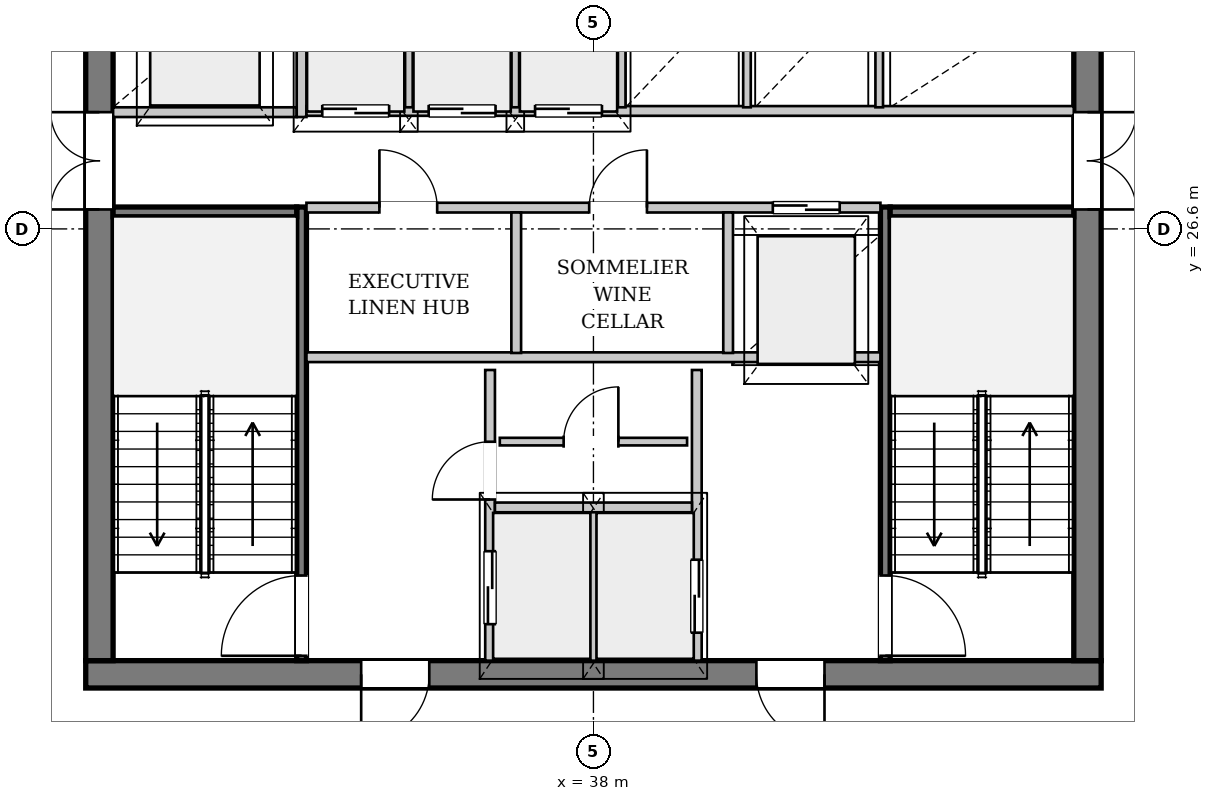
"""IFC4 building model, lengths in metres.
Left out: names, types, materials, properties, quantities, classifications, styles, units other than length and angle.
Written with IfcOpenShell. Run it as: python <this file> out.ifc"""

import sys

from ifc_helpers import new_model, si_unit, direction, frame, frame_2d, origin, place, context, subcontext, project, spatial, rectangle, extrude, source, transform, mapped, element, fill, save


model = new_model("IFC4")
c1 = context("Model", 3, precision=1e-05, world=origin(), true_north=direction((0.0, 1.0)))
c2 = subcontext(c1, "Body", "Model", "MODEL_VIEW")
j1 = project(units=[si_unit("LENGTHUNIT", "METRE"), si_unit("PLANEANGLEUNIT", "RADIAN")], contexts=[c1])
p1 = place(None, origin())
s1 = spatial("IfcSite", under=j1, at=p1, CompositionType="ELEMENT")
p2 = place(p1, origin())
s2 = spatial("IfcBuilding", under=s1, at=p2, CompositionType="ELEMENT")
p3 = place(p2, frame((0.0, 0.0, 234.5)))
s3 = spatial("IfcBuildingStorey", under=s2, at=p3, CompositionType="ELEMENT", Elevation=234.5)
p4 = place(p3, frame((52.618, 24.954, 0.0), z_axis=(0.0, 0.0, 1.0), x_axis=(-0.386897414412, -0.922122763368, 0.0)))
e1 = element("IfcWall", 1, at=p4, inside=s3, PredefinedType="SOLIDWALL", context=c2, shape_type="SweptSolid", body=[
    extrude(rectangle(XDim=22.869, YDim=0.32, at=frame_2d((11.435, 0.0))), origin(), (0.0, 0.0, 1.0), 2.872),
])
p5 = place(p4, frame((7.668, 0.0, 0.0)))
e2 = element("IfcOpeningElement", 2, at=p5, cuts=e1, PredefinedType="OPENING", context=c2, shape_type="SweptSolid", body=[
    extrude(rectangle(XDim=1.5, YDim=2.3, at=frame_2d((0.75, 1.15))), frame((0.0, 0.17, 0.0), z_axis=(0.0, -1.0, 0.0), x_axis=(1.0, 0.0, 0.0)), (0.0, 0.0, 1.0), 0.34),
])
p6 = place(p4, frame((15.623, 0.0, 0.402)))
e3 = element("IfcOpeningElement", 3, at=p6, cuts=e1, PredefinedType="OPENING", context=c2, shape_type="SweptSolid", body=[
    extrude(rectangle(XDim=2.6, YDim=2.35, at=frame_2d((1.3, 1.175))), frame((0.0, 0.17, 0.0), z_axis=(0.0, -1.0, 0.0), x_axis=(1.0, 0.0, 0.0)), (0.0, 0.0, 1.0), 0.34),
])
p7 = place(p3, frame((46.35, 19.275, 0.0), z_axis=(0.0, 0.0, 1.0), x_axis=(-1.0, 0.0, 0.0)))
e4 = element("IfcWall", 4, at=p7, inside=s3, PredefinedType="SHEAR", context=c2, shape_type="SweptSolid", body=[
    extrude(rectangle(XDim=16.7, YDim=0.45, at=frame_2d((8.35, 0.0))), origin(), (0.0, 0.0, 1.0), 3.38),
])
p8 = place(p7, frame((4.55, 0.0, 0.0)))
e5 = element("IfcOpeningElement", 5, at=p8, cuts=e4, PredefinedType="OPENING", context=c2, shape_type="SweptSolid", body=[
    extrude(rectangle(XDim=1.12, YDim=2.25, at=frame_2d((0.56, 1.125))), frame((0.0, 0.235, 0.0), z_axis=(0.0, -1.0, 0.0), x_axis=(1.0, 0.0, 0.0)), (0.0, 0.0, 1.0), 0.47),
])
p9 = place(p7, frame((11.05, 0.0, 0.0)))
e6 = element("IfcOpeningElement", 6, at=p9, cuts=e4, PredefinedType="OPENING", context=c2, shape_type="SweptSolid", body=[
    extrude(rectangle(XDim=1.12, YDim=2.25, at=frame_2d((0.56, 1.125))), frame((0.0, 0.235, 0.0), z_axis=(0.0, -1.0, 0.0), x_axis=(1.0, 0.0, 0.0)), (0.0, 0.0, 1.0), 0.47),
])
p10 = place(p3, frame((29.875, 19.5, 0.0), z_axis=(0.0, 0.0, 1.0), x_axis=(0.0, 1.0, 0.0)))
e7 = element("IfcWall", 7, at=p10, inside=s3, PredefinedType="SHEAR", context=c2, shape_type="SweptSolid", body=[
    extrude(rectangle(XDim=14.2, YDim=0.45, at=frame_2d((7.1, 0.0))), origin(), (0.0, 0.0, 1.0), 3.38),
])
p11 = place(p10, frame((7.42, 0.0, 0.0)))
e8 = element("IfcOpeningElement", 8, at=p11, cuts=e7, PredefinedType="OPENING", context=c2, shape_type="SweptSolid", body=[
    extrude(rectangle(XDim=1.6, YDim=2.2, at=frame_2d((0.8, 1.1))), frame((0.0, 0.235, 0.0), z_axis=(0.0, -1.0, 0.0), x_axis=(1.0, 0.0, 0.0)), (0.0, 0.0, 1.0), 0.47),
])
p12 = place(p3, frame((46.125, 33.7, 0.0), z_axis=(0.0, 0.0, 1.0), x_axis=(0.0, -1.0, 0.0)))
e9 = element("IfcWall", 9, at=p12, inside=s3, PredefinedType="SHEAR", context=c2, shape_type="SweptSolid", body=[
    extrude(rectangle(XDim=14.2, YDim=0.45, at=frame_2d((7.1, 0.0))), origin(), (0.0, 0.0, 1.0), 3.38),
])
p13 = place(p12, frame((5.18, 0.0, 0.0)))
e10 = element("IfcOpeningElement", 10, at=p13, cuts=e9, PredefinedType="OPENING", context=c2, shape_type="SweptSolid", body=[
    extrude(rectangle(XDim=1.6, YDim=2.2, at=frame_2d((0.8, 1.1))), frame((0.0, 0.235, 0.0), z_axis=(0.0, -1.0, 0.0), x_axis=(1.0, 0.0, 0.0)), (0.0, 0.0, 1.0), 0.47),
])
p14 = place(p12, frame((2.05, 0.0, 0.0)))
e11 = element("IfcOpeningElement", 11, at=p14, cuts=e9, PredefinedType="OPENING", context=c2, shape_type="SweptSolid", body=[
    extrude(rectangle(XDim=0.95, YDim=2.1, at=frame_2d((0.475, 1.05))), frame((0.0, 0.235, 0.0), z_axis=(0.0, -1.0, 0.0), x_axis=(1.0, 0.0, 0.0)), (0.0, 0.0, 1.0), 0.47),
])
p15 = place(p3, frame((33.2, 19.5, 0.0), z_axis=(0.0, 0.0, 1.0), x_axis=(0.0, 1.0, 0.0)))
e12 = element("IfcWall", 12, at=p15, inside=s3, PredefinedType="PARTITIONING", context=c2, shape_type="SweptSolid", body=[
    extrude(rectangle(XDim=7.46, YDim=0.16, at=frame_2d((3.73, 0.0))), origin(), (0.0, 0.0, 1.0), 3.38),
])
p16 = place(p15, frame((0.08, 0.0, 0.0)))
e13 = element("IfcOpeningElement", 13, at=p16, cuts=e12, PredefinedType="OPENING", context=c2, shape_type="SweptSolid", body=[
    extrude(rectangle(XDim=1.32, YDim=2.2, at=frame_2d((0.66, 1.1))), frame((0.0, 0.09, 0.0), z_axis=(0.0, -1.0, 0.0), x_axis=(1.0, 0.0, 0.0)), (0.0, 0.0, 1.0), 0.18),
])
p17 = place(p3, frame((30.1, 26.88, 0.0), z_axis=(0.0, 0.0, 1.0), x_axis=(1.0, 0.0, 0.0)))
e14 = element("IfcWall", 14, at=p17, inside=s3, PredefinedType="PARTITIONING", context=c2, shape_type="SweptSolid", body=[
    extrude(rectangle(XDim=3.02, YDim=0.16, at=frame_2d((1.51, 0.0))), origin(), (0.0, 0.0, 1.0), 3.38),
])
p18 = place(p3, frame((42.8, 26.96, 0.0), z_axis=(0.0, 0.0, 1.0), x_axis=(0.0, -1.0, 0.0)))
e15 = element("IfcWall", 15, at=p18, inside=s3, PredefinedType="PARTITIONING", context=c2, shape_type="SweptSolid", body=[
    extrude(rectangle(XDim=7.46, YDim=0.16, at=frame_2d((3.73, 0.0))), origin(), (0.0, 0.0, 1.0), 3.38),
])
p19 = place(p18, frame((6.06, 0.0, 0.0)))
e16 = element("IfcOpeningElement", 16, at=p19, cuts=e15, PredefinedType="OPENING", context=c2, shape_type="SweptSolid", body=[
    extrude(rectangle(XDim=1.32, YDim=2.2, at=frame_2d((0.66, 1.1))), frame((0.0, 0.09, 0.0), z_axis=(0.0, -1.0, 0.0), x_axis=(1.0, 0.0, 0.0)), (0.0, 0.0, 1.0), 0.18),
])
p20 = place(p3, frame((42.88, 26.88, 0.0), z_axis=(0.0, 0.0, 1.0), x_axis=(1.0, 0.0, 0.0)))
e17 = element("IfcWall", 17, at=p20, inside=s3, PredefinedType="PARTITIONING", context=c2, shape_type="SweptSolid", body=[
    extrude(rectangle(XDim=3.02, YDim=0.16, at=frame_2d((1.51, 0.0))), origin(), (0.0, 0.0, 1.0), 3.38),
])
p21 = place(p3, frame((36.3, 19.5, 0.0), z_axis=(0.0, 0.0, 1.0), x_axis=(0.0, 1.0, 0.0)))
e18 = element("IfcWall", 18, at=p21, inside=s3, PredefinedType="PARTITIONING", context=c2, shape_type="SweptSolid", body=[
    extrude(rectangle(XDim=4.78, YDim=0.16, at=frame_2d((2.39, 0.0))), origin(), (0.0, 0.0, 1.0), 3.38),
])
p22 = place(p21, frame((0.6, 0.0, 0.0)))
e19 = element("IfcOpeningElement", 19, at=p22, cuts=e18, PredefinedType="OPENING", context=c2, shape_type="SweptSolid", body=[
    extrude(rectangle(XDim=1.2, YDim=2.2, at=frame_2d((0.6, 1.1))), frame((0.0, 0.09, 0.0), z_axis=(0.0, -1.0, 0.0), x_axis=(1.0, 0.0, 0.0)), (0.0, 0.0, 1.0), 0.18),
])
p23 = place(p21, frame((2.65, 0.0, 0.0)))
e20 = element("IfcOpeningElement", 20, at=p23, cuts=e18, PredefinedType="OPENING", context=c2, shape_type="SweptSolid", body=[
    extrude(rectangle(XDim=0.95, YDim=2.1, at=frame_2d((0.475, 1.05))), frame((0.0, 0.09, 0.0), z_axis=(0.0, -1.0, 0.0), x_axis=(1.0, 0.0, 0.0)), (0.0, 0.0, 1.0), 0.18),
])
p24 = place(p3, frame((39.7, 24.28, 0.0), z_axis=(0.0, 0.0, 1.0), x_axis=(0.0, -1.0, 0.0)))
e21 = element("IfcWall", 21, at=p24, inside=s3, PredefinedType="PARTITIONING", context=c2, shape_type="SweptSolid", body=[
    extrude(rectangle(XDim=4.78, YDim=0.16, at=frame_2d((2.39, 0.0))), origin(), (0.0, 0.0, 1.0), 3.38),
])
p25 = place(p24, frame((3.12, 0.0, 0.0)))
e22 = element("IfcOpeningElement", 22, at=p25, cuts=e21, PredefinedType="OPENING", context=c2, shape_type="SweptSolid", body=[
    extrude(rectangle(XDim=1.2, YDim=2.2, at=frame_2d((0.6, 1.1))), frame((0.0, 0.09, 0.0), z_axis=(0.0, -1.0, 0.0), x_axis=(1.0, 0.0, 0.0)), (0.0, 0.0, 1.0), 0.18),
])
p26 = place(p3, frame((38.0, 19.5, 0.0), z_axis=(0.0, 0.0, 1.0), x_axis=(0.0, 1.0, 0.0)))
e23 = element("IfcWall", 23, at=p26, inside=s3, PredefinedType="PARTITIONING", context=c2, shape_type="SweptSolid", body=[
    extrude(rectangle(XDim=2.46, YDim=0.125, at=frame_2d((1.23, 0.0))), origin(), (0.0, 0.0, 1.0), 3.38),
])
p27 = place(p3, frame((36.38, 22.02, 0.0), z_axis=(0.0, 0.0, 1.0), x_axis=(1.0, 0.0, 0.0)))
e24 = element("IfcWall", 24, at=p27, inside=s3, PredefinedType="PARTITIONING", context=c2, shape_type="SweptSolid", body=[
    extrude(rectangle(XDim=3.24, YDim=0.16, at=frame_2d((1.62, 0.0))), origin(), (0.0, 0.0, 1.0), 3.38),
])
p28 = place(p3, frame((33.28, 24.49, 0.0), z_axis=(0.0, 0.0, 1.0), x_axis=(1.0, 0.0, 0.0)))
e25 = element("IfcWall", 25, at=p28, inside=s3, PredefinedType="PARTITIONING", context=c2, shape_type="SweptSolid", body=[
    extrude(rectangle(XDim=9.44, YDim=0.16, at=frame_2d((4.72, 0.0))), origin(), (0.0, 0.0, 1.0), 3.38),
])
p29 = place(p3, frame((36.46, 23.102, 0.0), z_axis=(0.0, 0.0, 1.0), x_axis=(1.0, 0.0, 0.0)))
e26 = element("IfcWall", 26, at=p29, inside=s3, PredefinedType="PARTITIONING", context=c2, shape_type="SweptSolid", body=[
    extrude(rectangle(XDim=3.08, YDim=0.125, at=frame_2d((1.54, 0.0))), origin(), (0.0, 0.0, 1.0), 3.38),
])
p30 = place(p29, frame((1.05, 0.0, 0.0)))
e27 = element("IfcOpeningElement", 27, at=p30, cuts=e26, PredefinedType="OPENING", context=c2, shape_type="SweptSolid", body=[
    extrude(rectangle(XDim=0.9, YDim=2.1, at=frame_2d((0.45, 1.05))), frame((0.0, 0.073, 0.0), z_axis=(0.0, -1.0, 0.0), x_axis=(1.0, 0.0, 0.0)), (0.0, 0.0, 1.0), 0.145),
])
p31 = place(p3, frame((30.1, 28.52, 0.0), z_axis=(0.0, 0.0, 1.0), x_axis=(1.0, 0.0, 0.0)))
e28 = element("IfcWall", 28, at=p31, inside=s3, PredefinedType="PARTITIONING", context=c2, shape_type="SweptSolid", body=[
    extrude(rectangle(XDim=3.02, YDim=0.16, at=frame_2d((1.51, 0.0))), origin(), (0.0, 0.0, 1.0), 3.38),
])
p32 = place(p3, frame((33.2, 28.44, 0.0), z_axis=(0.0, 0.0, 1.0), x_axis=(0.0, 1.0, 0.0)))
e29 = element("IfcWall", 29, at=p32, inside=s3, PredefinedType="PARTITIONING", context=c2, shape_type="SweptSolid", body=[
    extrude(rectangle(XDim=5.26, YDim=0.16, at=frame_2d((2.63, 0.0))), origin(), (0.0, 0.0, 1.0), 3.38),
])
p33 = place(p3, frame((33.28, 26.95, 0.0), z_axis=(0.0, 0.0, 1.0), x_axis=(1.0, 0.0, 0.0)))
e30 = element("IfcWall", 30, at=p33, inside=s3, PredefinedType="PARTITIONING", context=c2, shape_type="SweptSolid", body=[
    extrude(rectangle(XDim=9.44, YDim=0.16, at=frame_2d((4.72, 0.0))), origin(), (0.0, 0.0, 1.0), 3.38),
])
p34 = place(p33, frame((1.2, 0.0, 0.0)))
e31 = element("IfcOpeningElement", 31, at=p34, cuts=e30, PredefinedType="OPENING", context=c2, shape_type="SweptSolid", body=[
    extrude(rectangle(XDim=0.95, YDim=2.1, at=frame_2d((0.475, 1.05))), frame((0.0, 0.09, 0.0), z_axis=(0.0, -1.0, 0.0), x_axis=(1.0, 0.0, 0.0)), (0.0, 0.0, 1.0), 0.18),
])
p35 = place(p33, frame((4.65, 0.0, 0.0)))
e32 = element("IfcOpeningElement", 32, at=p35, cuts=e30, PredefinedType="OPENING", context=c2, shape_type="SweptSolid", body=[
    extrude(rectangle(XDim=0.95, YDim=2.1, at=frame_2d((0.475, 1.05))), frame((0.0, 0.09, 0.0), z_axis=(0.0, -1.0, 0.0), x_axis=(1.0, 0.0, 0.0)), (0.0, 0.0, 1.0), 0.18),
])
p36 = place(p33, frame((7.67, 0.0, 0.0)))
e33 = element("IfcOpeningElement", 33, at=p36, cuts=e30, PredefinedType="OPENING", context=c2, shape_type="SweptSolid", body=[
    extrude(rectangle(XDim=1.1, YDim=2.2, at=frame_2d((0.55, 1.1))), frame((0.0, 0.09, 0.0), z_axis=(0.0, -1.0, 0.0), x_axis=(1.0, 0.0, 0.0)), (0.0, 0.0, 1.0), 0.18),
])
for number, where, z_axis, x_axis in (
    (34, (36.73, 24.56, 0.0), (0.0, 0.0, 1.0), (0.0, 1.0, 0.0)),
    (35, (40.215, 24.56, 0.0), (0.0, 0.0, 1.0), (0.0, 1.0, 0.0)),
):
    element("IfcWall", number, at=place(p3, frame(where, z_axis=z_axis, x_axis=x_axis)), inside=s3, PredefinedType="PARTITIONING", context=c2, shape_type="SweptSolid", body=[
        extrude(rectangle(XDim=2.31, YDim=0.16, at=frame_2d((1.155, 0.0))), origin(), (0.0, 0.0, 1.0), 3.38),
    ])
p37 = place(p3, frame((33.28, 28.54, 0.0), z_axis=(0.0, 0.0, 1.0), x_axis=(1.0, 0.0, 0.0)))
e36 = element("IfcWall", 36, at=p37, inside=s3, PredefinedType="PARTITIONING", context=c2, shape_type="SweptSolid", body=[
    extrude(rectangle(XDim=12.62, YDim=0.16, at=frame_2d((6.31, 0.0))), origin(), (0.0, 0.0, 1.0), 3.38),
])
p38 = place(p37, frame((0.26, 0.0, 0.0)))
e37 = element("IfcOpeningElement", 37, at=p38, cuts=e36, PredefinedType="OPENING", context=c2, shape_type="SweptSolid", body=[
    extrude(rectangle(XDim=1.1, YDim=2.2, at=frame_2d((0.55, 1.1))), frame((0.0, 0.09, 0.0), z_axis=(0.0, -1.0, 0.0), x_axis=(1.0, 0.0, 0.0)), (0.0, 0.0, 1.0), 0.18),
])
p39 = place(p37, frame((2.01, 0.0, 0.0)))
e38 = element("IfcOpeningElement", 38, at=p39, cuts=e36, PredefinedType="OPENING", context=c2, shape_type="SweptSolid", body=[
    extrude(rectangle(XDim=1.1, YDim=2.2, at=frame_2d((0.55, 1.1))), frame((0.0, 0.09, 0.0), z_axis=(0.0, -1.0, 0.0), x_axis=(1.0, 0.0, 0.0)), (0.0, 0.0, 1.0), 0.18),
])
p40 = place(p37, frame((3.76, 0.0, 0.0)))
e39 = element("IfcOpeningElement", 39, at=p40, cuts=e36, PredefinedType="OPENING", context=c2, shape_type="SweptSolid", body=[
    extrude(rectangle(XDim=1.1, YDim=2.2, at=frame_2d((0.55, 1.1))), frame((0.0, 0.09, 0.0), z_axis=(0.0, -1.0, 0.0), x_axis=(1.0, 0.0, 0.0)), (0.0, 0.0, 1.0), 0.18),
])
for number, where, z_axis, x_axis in (
    (40, (34.965, 28.6, 0.0), (0.0, 0.0, 1.0), (0.0, 1.0, 0.0)),
    (41, (36.715, 28.6, 0.0), (0.0, 0.0, 1.0), (0.0, 1.0, 0.0)),
    (42, (38.465, 28.6, 0.0), (0.0, 0.0, 1.0), (0.0, 1.0, 0.0)),
    (43, (40.525, 28.6, 0.0), (0.0, 0.0, 1.0), (0.0, 1.0, 0.0)),
    (44, (42.7, 28.6, 0.0), (0.0, 0.0, 1.0), (0.0, 1.0, 0.0)),
):
    element("IfcWall", number, at=place(p3, frame(where, z_axis=z_axis, x_axis=x_axis)), inside=s3, PredefinedType="PARTITIONING", context=c2, shape_type="SweptSolid", body=[
        extrude(rectangle(XDim=1.92, YDim=0.125, at=frame_2d((0.96, 0.0))), origin(), (0.0, 0.0, 1.0), 3.38),
    ])
m1 = source(origin(), c2, "Body", "SweptSolid", [
    extrude(rectangle(XDim=1.12, YDim=2.25, at=frame_2d((0.56, 1.125))), frame((0.0, 0.025, 0.0), z_axis=(0.0, -1.0, 0.0), x_axis=(1.0, 0.0, 0.0)), (0.0, 0.0, 1.0), 0.05),
])
p41 = place(p8, origin())
e45 = element("IfcDoor", 45, at=p41, inside=s3, OperationType="SINGLE_SWING_LEFT", PredefinedType="DOOR", context=c2, shape_type="MappedRepresentation", body=[
    mapped(m1, transform((0.0, 0.0, 0.0), x_axis=(1.0, 0.0, 0.0), y_axis=(0.0, 1.0, 0.0), z_axis=(0.0, 0.0, 1.0), scale=1.0)),
])
fill(e5, e45)
p42 = place(p9, origin())
e46 = element("IfcDoor", 46, at=p42, inside=s3, OperationType="SINGLE_SWING_RIGHT", PredefinedType="DOOR", context=c2, shape_type="MappedRepresentation", body=[
    mapped(m1, transform((0.0, 0.0, 0.0), x_axis=(1.0, 0.0, 0.0), y_axis=(0.0, 1.0, 0.0), z_axis=(0.0, 0.0, 1.0), scale=1.0)),
])
fill(e6, e46)
m2 = source(origin(), c2, "Body", "SweptSolid", [
    extrude(rectangle(XDim=1.6, YDim=2.2, at=frame_2d((0.8, 1.1))), frame((0.0, 0.025, 0.0), z_axis=(0.0, -1.0, 0.0), x_axis=(1.0, 0.0, 0.0)), (0.0, 0.0, 1.0), 0.05),
])
p43 = place(p11, origin())
e47 = element("IfcDoor", 47, at=p43, inside=s3, OperationType="DOUBLE_DOOR_SINGLE_SWING", PredefinedType="DOOR", context=c2, shape_type="MappedRepresentation", body=[
    mapped(m2, transform((0.0, 0.0, 0.0), x_axis=(1.0, 0.0, 0.0), y_axis=(0.0, 1.0, 0.0), z_axis=(0.0, 0.0, 1.0), scale=1.0)),
])
fill(e8, e47)
p44 = place(p13, origin())
e48 = element("IfcDoor", 48, at=p44, inside=s3, OperationType="DOUBLE_DOOR_SINGLE_SWING", PredefinedType="DOOR", context=c2, shape_type="MappedRepresentation", body=[
    mapped(m2, transform((0.0, 0.0, 0.0), x_axis=(1.0, 0.0, 0.0), y_axis=(0.0, 1.0, 0.0), z_axis=(0.0, 0.0, 1.0), scale=1.0)),
])
fill(e10, e48)
m3 = source(origin(), c2, "Body", "SweptSolid", [
    extrude(rectangle(XDim=1.32, YDim=2.2, at=frame_2d((0.66, 1.1))), frame((0.0, 0.025, 0.0), z_axis=(0.0, -1.0, 0.0), x_axis=(1.0, 0.0, 0.0)), (0.0, 0.0, 1.0), 0.05),
])
p45 = place(p16, origin())
e49 = element("IfcDoor", 49, at=p45, inside=s3, OperationType="SINGLE_SWING_LEFT", PredefinedType="DOOR", context=c2, shape_type="MappedRepresentation", body=[
    mapped(m3, transform((0.0, 0.0, 0.0), x_axis=(1.0, 0.0, 0.0), y_axis=(0.0, 1.0, 0.0), z_axis=(0.0, 0.0, 1.0), scale=1.0)),
])
fill(e13, e49)
p46 = place(p19, origin())
e50 = element("IfcDoor", 50, at=p46, inside=s3, OperationType="SINGLE_SWING_RIGHT", PredefinedType="DOOR", context=c2, shape_type="MappedRepresentation", body=[
    mapped(m3, transform((0.0, 0.0, 0.0), x_axis=(1.0, 0.0, 0.0), y_axis=(0.0, 1.0, 0.0), z_axis=(0.0, 0.0, 1.0), scale=1.0)),
])
fill(e16, e50)
m4 = source(origin(), c2, "Body", "SweptSolid", [
    extrude(rectangle(XDim=1.2, YDim=2.2, at=frame_2d((0.6, 1.1))), frame((0.0, 0.025, 0.0), z_axis=(0.0, -1.0, 0.0), x_axis=(1.0, 0.0, 0.0)), (0.0, 0.0, 1.0), 0.05),
])
p47 = place(p22, origin())
e51 = element("IfcDoor", 51, at=p47, inside=s3, OperationType="DOUBLE_DOOR_SLIDING", PredefinedType="DOOR", context=c2, shape_type="MappedRepresentation", body=[
    mapped(m4, transform((0.0, 0.0, 0.0), x_axis=(1.0, 0.0, 0.0), y_axis=(0.0, 1.0, 0.0), z_axis=(0.0, 0.0, 1.0), scale=1.0)),
])
fill(e19, e51)
m5 = source(origin(), c2, "Body", "SweptSolid", [
    extrude(rectangle(XDim=0.95, YDim=2.1, at=frame_2d((0.475, 1.05))), frame((0.0, 0.025, 0.0), z_axis=(0.0, -1.0, 0.0), x_axis=(1.0, 0.0, 0.0)), (0.0, 0.0, 1.0), 0.05),
])
p48 = place(p23, origin())
e52 = element("IfcDoor", 52, at=p48, inside=s3, OperationType="SINGLE_SWING_LEFT", PredefinedType="DOOR", context=c2, shape_type="MappedRepresentation", body=[
    mapped(m5, transform((0.0, 0.0, 0.0), x_axis=(1.0, 0.0, 0.0), y_axis=(0.0, 1.0, 0.0), z_axis=(0.0, 0.0, 1.0), scale=1.0)),
])
fill(e20, e52)
m6 = source(origin(), c2, "Body", "SweptSolid", [
    extrude(rectangle(XDim=0.9, YDim=2.1, at=frame_2d((0.45, 1.05))), frame((0.0, 0.025, 0.0), z_axis=(0.0, -1.0, 0.0), x_axis=(1.0, 0.0, 0.0)), (0.0, 0.0, 1.0), 0.05),
])
p49 = place(p30, origin())
e53 = element("IfcDoor", 53, at=p49, inside=s3, OperationType="SINGLE_SWING_RIGHT", PredefinedType="DOOR", context=c2, shape_type="MappedRepresentation", body=[
    mapped(m6, transform((0.0, 0.0, 0.0), x_axis=(1.0, 0.0, 0.0), y_axis=(0.0, 1.0, 0.0), z_axis=(0.0, 0.0, 1.0), scale=1.0)),
])
fill(e27, e53)
p50 = place(p25, origin())
e54 = element("IfcDoor", 54, at=p50, inside=s3, OperationType="DOUBLE_DOOR_SLIDING", PredefinedType="DOOR", context=c2, shape_type="MappedRepresentation", body=[
    mapped(m4, transform((0.0, 0.0, 0.0), x_axis=(1.0, 0.0, 0.0), y_axis=(0.0, 1.0, 0.0), z_axis=(0.0, 0.0, 1.0), scale=1.0)),
])
fill(e22, e54)
p51 = place(p34, origin())
e55 = element("IfcDoor", 55, at=p51, inside=s3, OperationType="SINGLE_SWING_LEFT", PredefinedType="DOOR", context=c2, shape_type="MappedRepresentation", body=[
    mapped(m5, transform((0.0, 0.0, 0.0), x_axis=(1.0, 0.0, 0.0), y_axis=(0.0, 1.0, 0.0), z_axis=(0.0, 0.0, 1.0), scale=1.0)),
])
fill(e31, e55)
p52 = place(p35, origin())
e56 = element("IfcDoor", 56, at=p52, inside=s3, OperationType="SINGLE_SWING_RIGHT", PredefinedType="DOOR", context=c2, shape_type="MappedRepresentation", body=[
    mapped(m5, transform((0.0, 0.0, 0.0), x_axis=(1.0, 0.0, 0.0), y_axis=(0.0, 1.0, 0.0), z_axis=(0.0, 0.0, 1.0), scale=1.0)),
])
fill(e32, e56)
m7 = source(origin(), c2, "Body", "SweptSolid", [
    extrude(rectangle(XDim=1.1, YDim=2.2, at=frame_2d((0.55, 1.1))), frame((0.0, 0.025, 0.0), z_axis=(0.0, -1.0, 0.0), x_axis=(1.0, 0.0, 0.0)), (0.0, 0.0, 1.0), 0.05),
])
p53 = place(p36, origin())
e57 = element("IfcDoor", 57, at=p53, inside=s3, OperationType="DOUBLE_DOOR_SLIDING", PredefinedType="DOOR", context=c2, shape_type="MappedRepresentation", body=[
    mapped(m7, transform((0.0, 0.0, 0.0), x_axis=(1.0, 0.0, 0.0), y_axis=(0.0, 1.0, 0.0), z_axis=(0.0, 0.0, 1.0), scale=1.0)),
])
fill(e33, e57)
p54 = place(p38, origin())
e58 = element("IfcDoor", 58, at=p54, inside=s3, OperationType="DOUBLE_DOOR_SLIDING", PredefinedType="DOOR", context=c2, shape_type="MappedRepresentation", body=[
    mapped(m7, transform((0.0, 0.0, 0.0), x_axis=(1.0, 0.0, 0.0), y_axis=(0.0, 1.0, 0.0), z_axis=(0.0, 0.0, 1.0), scale=1.0)),
])
fill(e37, e58)
p55 = place(p39, origin())
e59 = element("IfcDoor", 59, at=p55, inside=s3, OperationType="DOUBLE_DOOR_SLIDING", PredefinedType="DOOR", context=c2, shape_type="MappedRepresentation", body=[
    mapped(m7, transform((0.0, 0.0, 0.0), x_axis=(1.0, 0.0, 0.0), y_axis=(0.0, 1.0, 0.0), z_axis=(0.0, 0.0, 1.0), scale=1.0)),
])
fill(e38, e59)
p56 = place(p40, origin())
e60 = element("IfcDoor", 60, at=p56, inside=s3, OperationType="DOUBLE_DOOR_SLIDING", PredefinedType="DOOR", context=c2, shape_type="MappedRepresentation", body=[
    mapped(m7, transform((0.0, 0.0, 0.0), x_axis=(1.0, 0.0, 0.0), y_axis=(0.0, 1.0, 0.0), z_axis=(0.0, 0.0, 1.0), scale=1.0)),
])
fill(e39, e60)
save(model, sys.argv[1])
